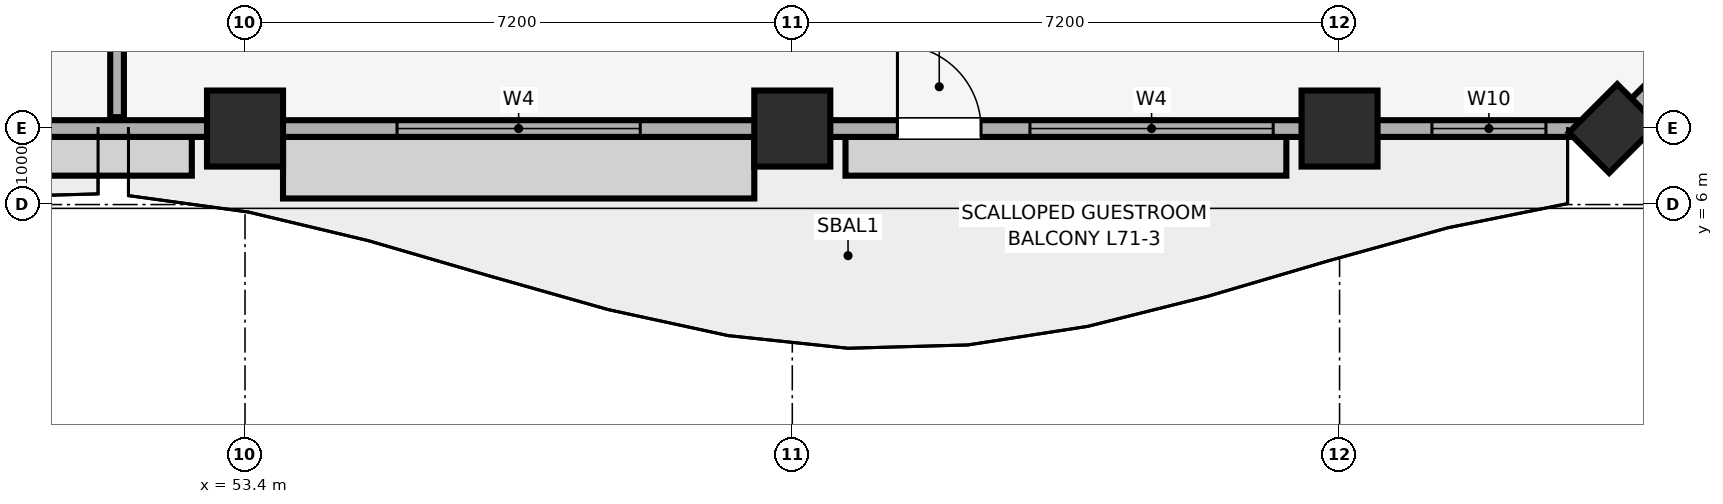
"""IFC4 building model, lengths in metres.
Left out: names, types, materials, properties, quantities, classifications, styles, units other than length and angle.
Written with IfcOpenShell. Run it as: python <this file> out.ifc"""

import sys

from ifc_helpers import new_model, si_unit, direction, frame, frame_2d, origin, origin_2d, place, context, subcontext, project, spatial, rectangle, extrude, element, fill, save


model = new_model("IFC4")
c1 = context("Model", 3, precision=1e-05, world=origin(), true_north=direction((0.0, 1.0)))
c2 = subcontext(c1, "Body", "Model", "MODEL_VIEW")
j1 = project(units=[si_unit("LENGTHUNIT", "METRE"), si_unit("PLANEANGLEUNIT", "RADIAN")], contexts=[c1])
p1 = place(None, origin())
s1 = spatial("IfcSite", under=j1, at=p1, CompositionType="ELEMENT")
p2 = place(p1, origin())
s2 = spatial("IfcBuilding", under=s1, at=p2, CompositionType="ELEMENT")
p3 = place(p2, frame((0.0, 0.0, 290.3)))
s3 = spatial("IfcBuildingStorey", under=s2, at=p3, CompositionType="ELEMENT", Elevation=290.3)
for number, where, z_axis, x_axis in (
    (1, (53.4, 7.0, 0.0), (0.0, 0.0, 1.0), (1.0, 0.0, 0.0)),
    (2, (60.6, 7.0, 0.0), (0.0, 0.0, 1.0), (1.0, 0.0, 0.0)),
    (3, (67.8, 7.0, 0.0), (0.0, 0.0, 1.0), (1.0, 0.0, 0.0)),
):
    element("IfcColumn", number, at=place(p3, frame(where, z_axis=z_axis, x_axis=x_axis)), inside=s3, PredefinedType="COLUMN", context=c2, shape_type="SweptSolid", body=[
        extrude(rectangle(XDim=1.0, YDim=1.0, at=origin_2d()), origin(), (0.0, 0.0, 1.0), 4.02),
    ])
p4 = place(p3, frame((71.4, 7.0, 0.0), z_axis=(0.0, 0.0, 1.0), x_axis=(0.707106781187, 0.707106781187, 0.0)))
e4 = element("IfcColumn", 4, at=p4, inside=s3, PredefinedType="PILASTER", context=c2, shape_type="SweptSolid", body=[
    extrude(rectangle(XDim=0.9, YDim=0.75, at=origin_2d()), origin(), (0.0, 0.0, 1.0), 4.02),
])
p5 = place(p3, frame((12.6, 7.0, 0.0), z_axis=(0.0, 0.0, 1.0), x_axis=(1.0, 0.0, 0.0)))
e5 = element("IfcWall", 5, at=p5, inside=s3, PredefinedType="SOLIDWALL", context=c2, shape_type="SweptSolid", body=[
    extrude(rectangle(XDim=58.8, YDim=0.22, at=frame_2d((29.4, 0.0))), origin(), (0.0, 0.0, 1.0), 3.22),
])
p6 = place(p5, frame((8.317, 0.0, 0.0)))
e6 = element("IfcOpeningElement", 6, at=p6, cuts=e5, PredefinedType="OPENING", context=c2, shape_type="SweptSolid", body=[
    extrude(rectangle(XDim=1.1, YDim=2.15, at=frame_2d((0.55, 1.075))), frame((0.0, 0.12, 0.0), z_axis=(0.0, -1.0, 0.0), x_axis=(1.0, 0.0, 0.0)), (0.0, 0.0, 1.0), 0.24),
])
p7 = place(p5, frame((27.272, 0.0, 0.0)))
e7 = element("IfcOpeningElement", 7, at=p7, cuts=e5, PredefinedType="OPENING", context=c2, shape_type="SweptSolid", body=[
    extrude(rectangle(XDim=1.1, YDim=2.15, at=frame_2d((0.55, 1.075))), frame((0.0, 0.12, 0.0), z_axis=(0.0, -1.0, 0.0), x_axis=(1.0, 0.0, 0.0)), (0.0, 0.0, 1.0), 0.24),
])
p8 = place(p5, frame((49.383, 0.0, 0.0)))
e8 = element("IfcOpeningElement", 8, at=p8, cuts=e5, PredefinedType="OPENING", context=c2, shape_type="SweptSolid", body=[
    extrude(rectangle(XDim=1.1, YDim=2.15, at=frame_2d((0.55, 1.075))), frame((0.0, 0.12, 0.0), z_axis=(0.0, -1.0, 0.0), x_axis=(1.0, 0.0, 0.0)), (0.0, 0.0, 1.0), 0.24),
])
p9 = place(p5, frame((0.885, 0.0, 0.85)))
e9 = element("IfcOpeningElement", 9, at=p9, cuts=e5, PredefinedType="OPENING", context=c2, shape_type="SweptSolid", body=[
    extrude(rectangle(XDim=1.5, YDim=1.4, at=frame_2d((0.75, 0.7))), frame((0.0, 0.12, 0.0), z_axis=(0.0, -1.0, 0.0), x_axis=(1.0, 0.0, 0.0)), (0.0, 0.0, 1.0), 0.24),
])
p10 = place(p5, frame((4.473, 0.0, 0.85)))
e10 = element("IfcOpeningElement", 10, at=p10, cuts=e5, PredefinedType="OPENING", context=c2, shape_type="SweptSolid", body=[
    extrude(rectangle(XDim=3.2, YDim=1.85, at=frame_2d((1.6, 0.925))), frame((0.0, 0.12, 0.0), z_axis=(0.0, -1.0, 0.0), x_axis=(1.0, 0.0, 0.0)), (0.0, 0.0, 1.0), 0.24),
])
p11 = place(p5, frame((12.8, 0.0, 0.85)))
e11 = element("IfcOpeningElement", 11, at=p11, cuts=e5, PredefinedType="OPENING", context=c2, shape_type="SweptSolid", body=[
    extrude(rectangle(XDim=3.2, YDim=1.85, at=frame_2d((1.6, 0.925))), frame((0.0, 0.12, 0.0), z_axis=(0.0, -1.0, 0.0), x_axis=(1.0, 0.0, 0.0)), (0.0, 0.0, 1.0), 0.24),
])
p12 = place(p5, frame((20.642, 0.0, 0.85)))
e12 = element("IfcOpeningElement", 12, at=p12, cuts=e5, PredefinedType="OPENING", context=c2, shape_type="SweptSolid", body=[
    extrude(rectangle(XDim=3.2, YDim=1.85, at=frame_2d((1.6, 0.925))), frame((0.0, 0.12, 0.0), z_axis=(0.0, -1.0, 0.0), x_axis=(1.0, 0.0, 0.0)), (0.0, 0.0, 1.0), 0.24),
])
p13 = place(p5, frame((29.271, 0.0, 0.85)))
e13 = element("IfcOpeningElement", 13, at=p13, cuts=e5, PredefinedType="OPENING", context=c2, shape_type="SweptSolid", body=[
    extrude(rectangle(XDim=3.2, YDim=1.85, at=frame_2d((1.6, 0.925))), frame((0.0, 0.12, 0.0), z_axis=(0.0, -1.0, 0.0), x_axis=(1.0, 0.0, 0.0)), (0.0, 0.0, 1.0), 0.24),
])
p14 = place(p5, frame((34.958, 0.0, 0.85)))
e14 = element("IfcOpeningElement", 14, at=p14, cuts=e5, PredefinedType="OPENING", context=c2, shape_type="SweptSolid", body=[
    extrude(rectangle(XDim=3.2, YDim=1.85, at=frame_2d((1.6, 0.925))), frame((0.0, 0.12, 0.0), z_axis=(0.0, -1.0, 0.0), x_axis=(1.0, 0.0, 0.0)), (0.0, 0.0, 1.0), 0.24),
])
p15 = place(p5, frame((42.8, 0.0, 0.85)))
e15 = element("IfcOpeningElement", 15, at=p15, cuts=e5, PredefinedType="OPENING", context=c2, shape_type="SweptSolid", body=[
    extrude(rectangle(XDim=3.2, YDim=1.85, at=frame_2d((1.6, 0.925))), frame((0.0, 0.12, 0.0), z_axis=(0.0, -1.0, 0.0), x_axis=(1.0, 0.0, 0.0)), (0.0, 0.0, 1.0), 0.24),
])
p16 = place(p5, frame((51.127, 0.0, 0.85)))
e16 = element("IfcOpeningElement", 16, at=p16, cuts=e5, PredefinedType="OPENING", context=c2, shape_type="SweptSolid", body=[
    extrude(rectangle(XDim=3.2, YDim=1.85, at=frame_2d((1.6, 0.925))), frame((0.0, 0.12, 0.0), z_axis=(0.0, -1.0, 0.0), x_axis=(1.0, 0.0, 0.0)), (0.0, 0.0, 1.0), 0.24),
])
p17 = place(p5, frame((56.415, 0.0, 0.85)))
e17 = element("IfcOpeningElement", 17, at=p17, cuts=e5, PredefinedType="OPENING", context=c2, shape_type="SweptSolid", body=[
    extrude(rectangle(XDim=1.5, YDim=1.4, at=frame_2d((0.75, 0.7))), frame((0.0, 0.12, 0.0), z_axis=(0.0, -1.0, 0.0), x_axis=(1.0, 0.0, 0.0)), (0.0, 0.0, 1.0), 0.24),
])
p18 = place(p3, frame((71.4, 7.0, 0.0), z_axis=(0.0, 0.0, 1.0), x_axis=(0.707106781187, 0.707106781187, 0.0)))
e18 = element("IfcWall", 18, at=p18, inside=s3, PredefinedType="SOLIDWALL", context=c2, shape_type="SweptSolid", body=[
    extrude(rectangle(XDim=5.091, YDim=0.22, at=frame_2d((2.546, 0.0))), origin(), (0.0, 0.0, 1.0), 3.22),
])
p19 = place(p18, frame((1.496, 0.0, 0.85)))
e19 = element("IfcOpeningElement", 19, at=p19, cuts=e18, PredefinedType="OPENING", context=c2, shape_type="SweptSolid", body=[
    extrude(rectangle(XDim=2.1, YDim=1.6, at=frame_2d((1.05, 0.8))), frame((0.0, 0.12, 0.0), z_axis=(0.0, -1.0, 0.0), x_axis=(1.0, 0.0, 0.0)), (0.0, 0.0, 1.0), 0.24),
])
p20 = place(p3, frame((51.717, 7.15, 0.0), z_axis=(0.0, 0.0, 1.0), x_axis=(0.0, 1.0, 0.0)))
e20 = element("IfcWall", 20, at=p20, inside=s3, PredefinedType="PARTITIONING", context=c2, shape_type="SweptSolid", body=[
    extrude(rectangle(XDim=15.555, YDim=0.18, at=frame_2d((7.778, 0.0))), origin(), (0.0, 0.0, 1.0), 4.02),
])
p21 = place(p8, origin())
e21 = element("IfcDoor", 21, at=p21, inside=s3, OperationType="SINGLE_SWING_LEFT", PredefinedType="DOOR", context=c2, shape_type="SweptSolid", body=[
    extrude(rectangle(XDim=1.1, YDim=2.15, at=frame_2d((0.55, 1.075))), frame((0.0, 0.025, 0.0), z_axis=(0.0, -1.0, 0.0), x_axis=(1.0, 0.0, 0.0)), (0.0, 0.0, 1.0), 0.05),
])
fill(e8, e21)
p22 = place(p15, origin())
e22 = element("IfcWindow", 22, at=p22, inside=s3, PartitioningType="SINGLE_PANEL", PredefinedType="WINDOW", context=c2, shape_type="SweptSolid", body=[
    extrude(rectangle(XDim=3.2, YDim=1.85, at=frame_2d((1.6, 0.925))), frame((0.0, 0.03, 0.0), z_axis=(0.0, -1.0, 0.0), x_axis=(1.0, 0.0, 0.0)), (0.0, 0.0, 1.0), 0.06),
])
fill(e15, e22)
p23 = place(p16, origin())
e23 = element("IfcWindow", 23, at=p23, inside=s3, PartitioningType="SINGLE_PANEL", PredefinedType="WINDOW", context=c2, shape_type="SweptSolid", body=[
    extrude(rectangle(XDim=3.2, YDim=1.85, at=frame_2d((1.6, 0.925))), frame((0.0, 0.03, 0.0), z_axis=(0.0, -1.0, 0.0), x_axis=(1.0, 0.0, 0.0)), (0.0, 0.0, 1.0), 0.06),
])
fill(e16, e23)
p24 = place(p17, origin())
e24 = element("IfcWindow", 24, at=p24, inside=s3, PartitioningType="SINGLE_PANEL", PredefinedType="WINDOW", context=c2, shape_type="SweptSolid", body=[
    extrude(rectangle(XDim=1.5, YDim=1.4, at=frame_2d((0.75, 0.7))), frame((0.0, 0.03, 0.0), z_axis=(0.0, -1.0, 0.0), x_axis=(1.0, 0.0, 0.0)), (0.0, 0.0, 1.0), 0.06),
])
fill(e17, e24)
save(model, sys.argv[1])
